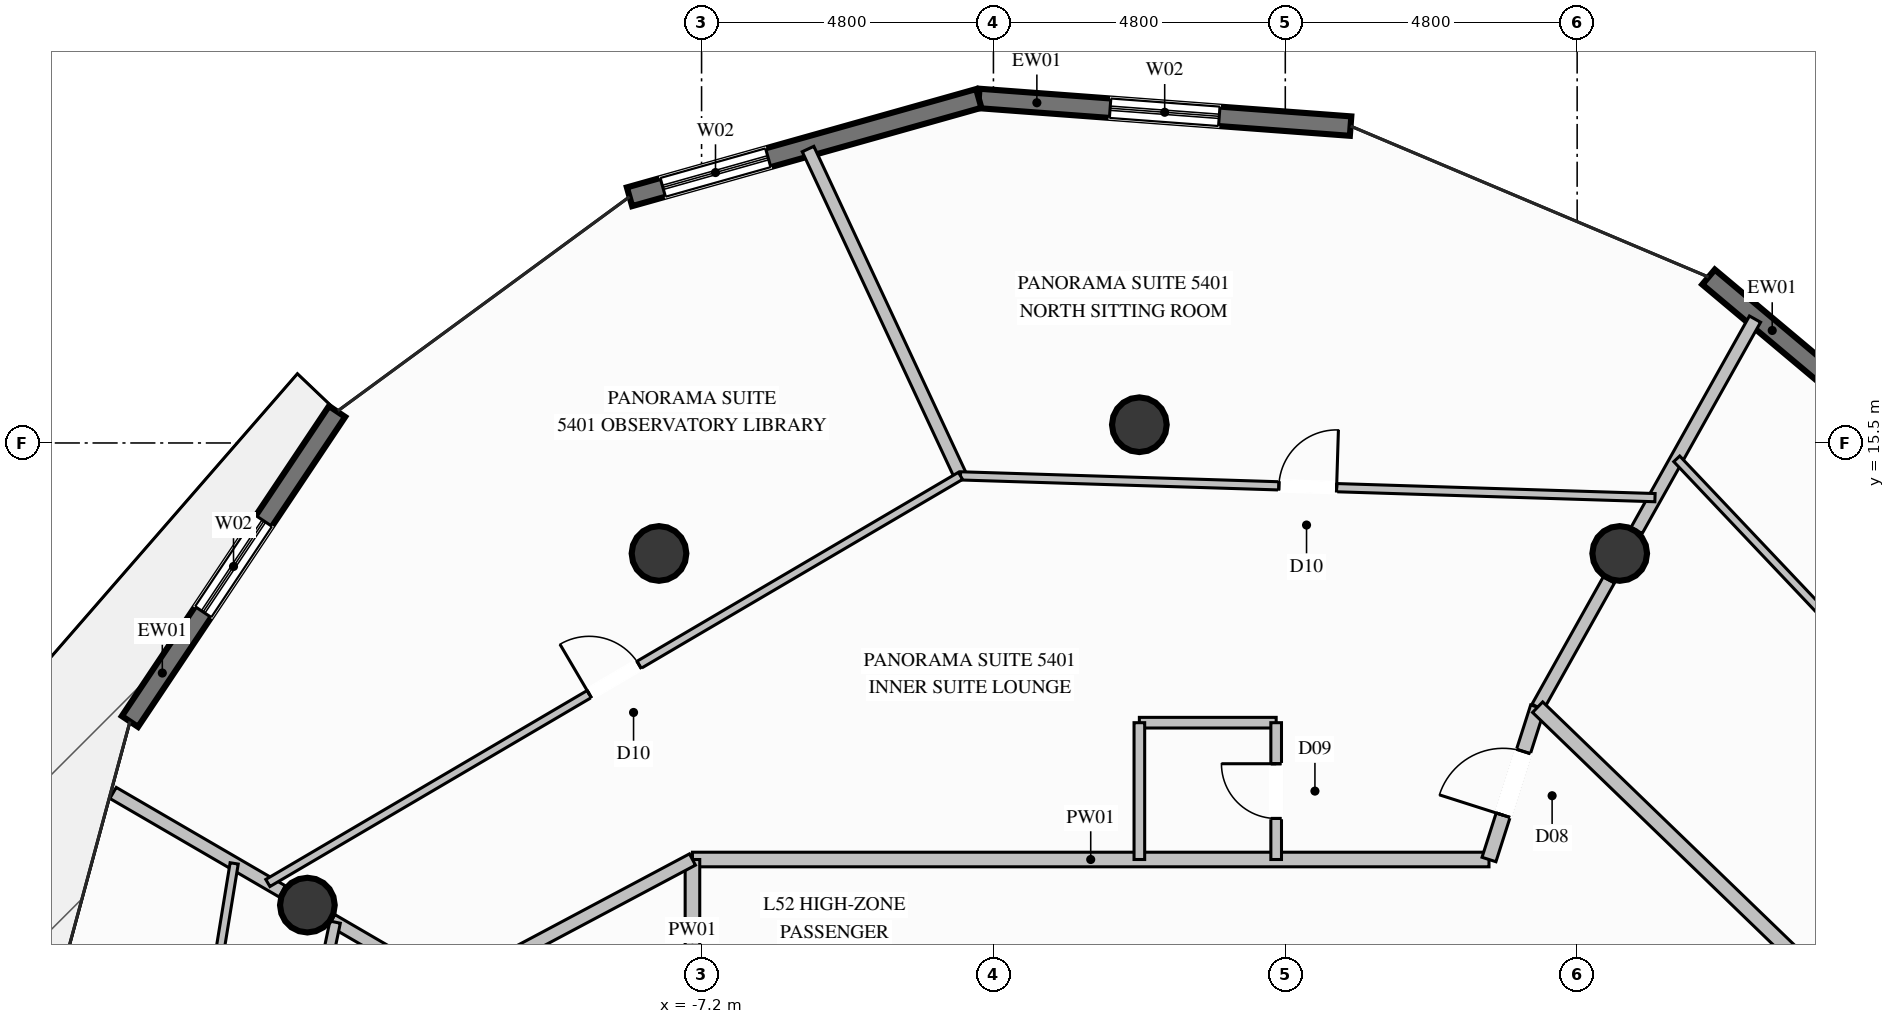
"""IFC4 building model, lengths in metres.
Left out: names, types, materials, properties, quantities, classifications, styles, units other than length and angle.
Written with IfcOpenShell. Run it as: python <this file> out.ifc"""

import sys

from ifc_helpers import new_model, si_unit, direction, frame, frame_2d, origin, origin_2d, place, context, subcontext, project, spatial, rectangle, circle, extrude, element, fill, save


model = new_model("IFC4")
c1 = context("Model", 3, precision=1e-05, world=origin(), true_north=direction((0.0, 1.0)))
c2 = subcontext(c1, "Body", "Model", "MODEL_VIEW")
j1 = project(units=[si_unit("LENGTHUNIT", "METRE"), si_unit("PLANEANGLEUNIT", "RADIAN")], contexts=[c1])
p1 = place(None, origin())
s1 = spatial("IfcSite", under=j1, at=p1, CompositionType="ELEMENT")
p2 = place(p1, origin())
s2 = spatial("IfcBuilding", under=s1, at=p2, CompositionType="ELEMENT")
p3 = place(p2, frame((0.0, 0.0, 202.0)))
s3 = spatial("IfcBuildingStorey", under=s2, at=p3, CompositionType="ELEMENT", Elevation=202.0)
for number, where, z_axis, x_axis in (
    (1, (7.9, 13.683, 0.0), (0.0, 0.0, 1.0), (1.0, 0.0, 0.0)),
    (2, (0.0, 15.8, 0.0), (0.0, 0.0, 1.0), (1.0, 0.0, 0.0)),
    (3, (-7.9, 13.683, 0.0), (0.0, 0.0, 1.0), (1.0, 0.0, 0.0)),
    (4, (-13.683, 7.9, 0.0), (0.0, 0.0, 1.0), (1.0, 0.0, 0.0)),
):
    element("IfcColumn", number, at=place(p3, frame(where, z_axis=z_axis, x_axis=x_axis)), inside=s3, PredefinedType="COLUMN", context=c2, shape_type="SweptSolid", body=[
        extrude(circle(Radius=0.45, at=origin_2d()), origin(), (0.0, 0.0, 1.0), 3.6),
    ])
p4 = place(p3, frame((9.361, 18.229, 0.0), z_axis=(0.0, 0.0, 1.0), x_axis=(0.765961316102, -0.642886663601, 0.0)))
e5 = element("IfcWall", 5, at=p4, inside=s3, PredefinedType="SOLIDWALL", context=c2, shape_type="SweptSolid", body=[
    extrude(rectangle(XDim=6.637, YDim=0.32, at=frame_2d((3.319, 0.0))), origin(), (0.0, 0.0, 1.0), 3.36),
])
p5 = place(p4, frame((2.984, 0.0, 0.35)))
e6 = element("IfcOpeningElement", 6, at=p5, cuts=e5, PredefinedType="OPENING", context=c2, shape_type="SweptSolid", body=[
    extrude(rectangle(XDim=1.8, YDim=2.6, at=frame_2d((0.9, 1.3))), frame((0.0, 0.17, 0.0), z_axis=(0.0, -1.0, 0.0), x_axis=(1.0, 0.0, 0.0)), (0.0, 0.0, 1.0), 0.34),
])
p6 = place(p3, frame((-2.641, 21.166, 0.0), z_axis=(0.0, 0.0, 1.0), x_axis=(0.997242494029, -0.074211913481, 0.0)))
e7 = element("IfcWall", 7, at=p6, inside=s3, PredefinedType="SOLIDWALL", context=c2, shape_type="SweptSolid", body=[
    extrude(rectangle(XDim=6.132, YDim=0.32, at=frame_2d((3.066, 0.0))), origin(), (0.0, 0.0, 1.0), 3.36),
])
p7 = place(p6, frame((2.166, 0.0, 0.35)))
e8 = element("IfcOpeningElement", 8, at=p7, cuts=e7, PredefinedType="OPENING", context=c2, shape_type="SweptSolid", body=[
    extrude(rectangle(XDim=1.8, YDim=2.6, at=frame_2d((0.9, 1.3))), frame((0.0, 0.17, 0.0), z_axis=(0.0, -1.0, 0.0), x_axis=(1.0, 0.0, 0.0)), (0.0, 0.0, 1.0), 0.34),
])
p8 = place(p3, frame((-8.385, 19.549, 0.0), z_axis=(0.0, 0.0, 1.0), x_axis=(0.962586598212, 0.270974244058, 0.0)))
e9 = element("IfcWall", 9, at=p8, inside=s3, PredefinedType="SOLIDWALL", context=c2, shape_type="SweptSolid", body=[
    extrude(rectangle(XDim=5.967, YDim=0.32, at=frame_2d((2.983, 0.0))), origin(), (0.0, 0.0, 1.0), 3.36),
])
p9 = place(p8, frame((0.569, 0.0, 0.35)))
e10 = element("IfcOpeningElement", 10, at=p9, cuts=e9, PredefinedType="OPENING", context=c2, shape_type="SweptSolid", body=[
    extrude(rectangle(XDim=1.8, YDim=2.6, at=frame_2d((0.9, 1.3))), frame((0.0, 0.17, 0.0), z_axis=(0.0, -1.0, 0.0), x_axis=(1.0, 0.0, 0.0)), (0.0, 0.0, 1.0), 0.34),
])
p10 = place(p3, frame((-16.601, 10.92, 0.0), z_axis=(0.0, 0.0, 1.0), x_axis=(0.555517753524, 0.831504675585, 0.0)))
e11 = element("IfcWall", 11, at=p10, inside=s3, PredefinedType="SOLIDWALL", context=c2, shape_type="SweptSolid", body=[
    extrude(rectangle(XDim=6.131, YDim=0.32, at=frame_2d((3.066, 0.0))), origin(), (0.0, 0.0, 1.0), 3.36),
])
p11 = place(p10, frame((2.166, 0.0, 0.35)))
e12 = element("IfcOpeningElement", 12, at=p11, cuts=e11, PredefinedType="OPENING", context=c2, shape_type="SweptSolid", body=[
    extrude(rectangle(XDim=1.8, YDim=2.6, at=frame_2d((0.9, 1.3))), frame((0.0, 0.17, 0.0), z_axis=(0.0, -1.0, 0.0), x_axis=(1.0, 0.0, 0.0)), (0.0, 0.0, 1.0), 0.34),
])
p12 = place(p3, frame((-7.35, 8.65, 0.0), z_axis=(0.0, 0.0, 1.0), x_axis=(1.0, 0.0, 0.0)))
e13 = element("IfcWall", 13, at=p12, inside=s3, PredefinedType="PARTITIONING", context=c2, shape_type="SweptSolid", body=[
    extrude(rectangle(XDim=13.1, YDim=0.24, at=frame_2d((6.55, 0.0))), origin(), (0.0, 0.0, 1.0), 3.36),
])
p13 = place(p3, frame((-7.35, 4.95, 0.0), z_axis=(0.0, 0.0, 1.0), x_axis=(0.0, 1.0, 0.0)))
e14 = element("IfcWall", 14, at=p13, inside=s3, PredefinedType="PARTITIONING", context=c2, shape_type="SweptSolid", body=[
    extrude(rectangle(XDim=3.7, YDim=0.24, at=frame_2d((1.85, 0.0))), origin(), (0.0, 0.0, 1.0), 2.445),
])
p14 = place(p3, frame((6.55, 11.155, 0.0), z_axis=(0.0, 0.0, 1.0), x_axis=(0.488535184748, 0.872544195593, 0.0)))
e15 = element("IfcWall", 15, at=p14, inside=s3, PredefinedType="PARTITIONING", context=c2, shape_type="SweptSolid", body=[
    extrude(rectangle(XDim=2.399, YDim=0.21, at=frame_2d((1.199, 0.0))), origin(), (0.0, 0.0, 1.0), 2.801),
])
p15 = place(p3, frame((8.178, 14.062, 0.0), z_axis=(0.0, 0.0, 1.0), x_axis=(0.488788123952, 0.87240252744, 0.0)))
e16 = element("IfcWall", 16, at=p15, inside=s3, PredefinedType="PARTITIONING", context=c2, shape_type="SweptSolid", body=[
    extrude(rectangle(XDim=3.983, YDim=0.21, at=frame_2d((1.992, 0.0))), origin(), (0.0, 0.0, 1.0), 3.36),
])
p16 = place(p3, frame((-11.345, 6.525, 0.0), z_axis=(0.0, 0.0, 1.0), x_axis=(-0.864228712324, 0.5030991282, 0.0)))
e17 = element("IfcWall", 17, at=p16, inside=s3, PredefinedType="PARTITIONING", context=c2, shape_type="SweptSolid", body=[
    extrude(rectangle(XDim=2.242, YDim=0.21, at=frame_2d((1.121, 0.0))), origin(), (0.0, 0.0, 1.0), 2.801),
])
p17 = place(p3, frame((-14.095, 8.125, 0.0), z_axis=(0.0, 0.0, 1.0), x_axis=(-0.864298015092, 0.502980060348, 0.0)))
e18 = element("IfcWall", 18, at=p17, inside=s3, PredefinedType="PARTITIONING", context=c2, shape_type="SweptSolid", body=[
    extrude(rectangle(XDim=3.221, YDim=0.21, at=frame_2d((1.61, 0.0))), origin(), (0.0, 0.0, 1.0), 3.36),
])
for number, where, z_axis, x_axis in (
    (19, (0.0, 10.9, 0.0), (0.0, 0.0, 1.0), (1.0, 0.0, 0.0)),
    (20, (0.0, 10.9, 0.0), (0.0, 0.0, 1.0), (0.0, -1.0, 0.0)),
):
    element("IfcWall", number, at=place(p3, frame(where, z_axis=z_axis, x_axis=x_axis)), inside=s3, PredefinedType="PLUMBINGWALL", context=c2, shape_type="SweptSolid", body=[
        extrude(rectangle(XDim=2.25, YDim=0.175, at=frame_2d((1.125, 0.0))), origin(), (0.0, 0.0, 1.0), 3.36),
    ])
p18 = place(p3, frame((2.25, 8.65, 0.0), z_axis=(0.0, 0.0, 1.0), x_axis=(0.0, 1.0, 0.0)))
e21 = element("IfcWall", 21, at=p18, inside=s3, PredefinedType="PLUMBINGWALL", context=c2, shape_type="SweptSolid", body=[
    extrude(rectangle(XDim=2.25, YDim=0.175, at=frame_2d((1.125, 0.0))), origin(), (0.0, 0.0, 1.0), 3.36),
])
p19 = place(p18, frame((0.675, 0.0, 0.0)))
e22 = element("IfcOpeningElement", 22, at=p19, cuts=e21, PredefinedType="OPENING", context=c2, shape_type="SweptSolid", body=[
    extrude(rectangle(XDim=0.9, YDim=2.1, at=frame_2d((0.45, 1.05))), frame((0.0, 0.098, 0.0), z_axis=(0.0, -1.0, 0.0), x_axis=(1.0, 0.0, 0.0)), (0.0, 0.0, 1.0), 0.195),
])
p20 = place(p3, frame((-11.345, 6.525, 0.0), z_axis=(0.0, 0.0, 1.0), x_axis=(0.882866201619, 0.469624605445, 0.0)))
e23 = element("IfcWall", 23, at=p20, inside=s3, PredefinedType="PARTITIONING", context=c2, shape_type="SweptSolid", body=[
    extrude(rectangle(XDim=4.525, YDim=0.21, at=frame_2d((2.262, 0.0))), origin(), (0.0, 0.0, 1.0), 3.36),
])
p21 = place(p3, frame((5.75, 8.65, 0.0), z_axis=(0.0, 0.0, 1.0), x_axis=(0.304226604656, 0.952599691906, 0.0)))
e24 = element("IfcWall", 24, at=p21, inside=s3, PredefinedType="PARTITIONING", context=c2, shape_type="SweptSolid", body=[
    extrude(rectangle(XDim=2.63, YDim=0.24, at=frame_2d((1.315, 0.0))), origin(), (0.0, 0.0, 1.0), 3.36),
])
p22 = place(p21, frame((0.765, 0.0, 0.0)))
e25 = element("IfcOpeningElement", 25, at=p22, cuts=e24, PredefinedType="OPENING", context=c2, shape_type="SweptSolid", body=[
    extrude(rectangle(XDim=1.1, YDim=2.3, at=frame_2d((0.55, 1.15))), frame((0.0, 0.13, 0.0), z_axis=(0.0, -1.0, 0.0), x_axis=(1.0, 0.0, 0.0)), (0.0, 0.0, 1.0), 0.26),
])
p23 = place(p3, frame((-2.942, 14.959, 0.0), z_axis=(0.0, 0.0, 1.0), x_axis=(-0.422711938281, 0.906264099054, 0.0)))
e26 = element("IfcWall", 26, at=p23, inside=s3, PredefinedType="PARTITIONING", context=c2, shape_type="SweptSolid", body=[
    extrude(rectangle(XDim=5.931, YDim=0.21, at=frame_2d((2.965, 0.0))), origin(), (0.0, 0.0, 1.0), 3.36),
])
p24 = place(p3, frame((-2.942, 14.959, 0.0), z_axis=(0.0, 0.0, 1.0), x_axis=(0.999509404504, -0.031320126261, 0.0)))
e27 = element("IfcWall", 27, at=p24, inside=s3, PredefinedType="PARTITIONING", context=c2, shape_type="SweptSolid", body=[
    extrude(rectangle(XDim=11.427, YDim=0.135, at=frame_2d((5.714, 0.0))), origin(), (0.0, 0.0, 1.0), 2.929),
])
p25 = place(p24, frame((5.239, 0.0, 0.0)))
e28 = element("IfcOpeningElement", 28, at=p25, cuts=e27, PredefinedType="OPENING", context=c2, shape_type="SweptSolid", body=[
    extrude(rectangle(XDim=0.95, YDim=2.1, at=frame_2d((0.475, 1.05))), frame((0.0, 0.078, 0.0), z_axis=(0.0, -1.0, 0.0), x_axis=(1.0, 0.0, 0.0)), (0.0, 0.0, 1.0), 0.155),
])
p26 = place(p3, frame((-14.333, 8.264, 0.0), z_axis=(0.0, 0.0, 1.0), x_axis=(0.862118932007, 0.506705976948, 0.0)))
e29 = element("IfcWall", 29, at=p26, inside=s3, PredefinedType="PARTITIONING", context=c2, shape_type="SweptSolid", body=[
    extrude(rectangle(XDim=13.213, YDim=0.135, at=frame_2d((6.606, 0.0))), origin(), (0.0, 0.0, 1.0), 2.929),
])
p27 = place(p26, frame((6.131, 0.0, 0.0)))
e30 = element("IfcOpeningElement", 30, at=p27, cuts=e29, PredefinedType="OPENING", context=c2, shape_type="SweptSolid", body=[
    extrude(rectangle(XDim=0.95, YDim=2.1, at=frame_2d((0.475, 1.05))), frame((0.0, 0.078, 0.0), z_axis=(0.0, -1.0, 0.0), x_axis=(1.0, 0.0, 0.0)), (0.0, 0.0, 1.0), 0.155),
])
p28 = place(p3, frame((-13.227, 7.62, 0.0), z_axis=(0.0, 0.0, 1.0), x_axis=(-0.203899627086, -0.978991798778, 0.0)))
e31 = element("IfcWall", 31, at=p28, inside=s3, PredefinedType="PLUMBINGWALL", context=c2, shape_type="SweptSolid", body=[
    extrude(rectangle(XDim=3.212, YDim=0.175, at=frame_2d((1.606, 0.0))), origin(), (0.0, 0.0, 1.0), 2.929),
])
p29 = place(p3, frame((-14.887, 8.586, 0.0), z_axis=(0.0, 0.0, 1.0), x_axis=(-0.16114427543, -0.986930860038, 0.0)))
e32 = element("IfcWall", 32, at=p29, inside=s3, PredefinedType="PARTITIONING", context=c2, shape_type="SweptSolid", body=[
    extrude(rectangle(XDim=8.627, YDim=0.135, at=frame_2d((4.313, 0.0))), origin(), (0.0, 0.0, 1.0), 2.929),
])
p30 = place(p29, frame((3.838, 0.0, 0.0)))
e33 = element("IfcOpeningElement", 33, at=p30, cuts=e32, PredefinedType="OPENING", context=c2, shape_type="SweptSolid", body=[
    extrude(rectangle(XDim=0.95, YDim=2.1, at=frame_2d((0.475, 1.05))), frame((0.0, 0.078, 0.0), z_axis=(0.0, -1.0, 0.0), x_axis=(1.0, 0.0, 0.0)), (0.0, 0.0, 1.0), 0.155),
])
p31 = place(p3, frame((11.345, 6.525, 0.0), z_axis=(0.0, 0.0, 1.0), x_axis=(-0.719360436772, 0.694637000172, 0.0)))
e34 = element("IfcWall", 34, at=p31, inside=s3, PredefinedType="PARTITIONING", context=c2, shape_type="SweptSolid", body=[
    extrude(rectangle(XDim=6.666, YDim=0.24, at=frame_2d((3.333, 0.0))), origin(), (0.0, 0.0, 1.0), 3.36),
])
p32 = place(p3, frame((15.048, 8.679, 0.0), z_axis=(0.0, 0.0, 1.0), x_axis=(-0.687476978128, 0.726206172202, 0.0)))
e35 = element("IfcWall", 35, at=p32, inside=s3, PredefinedType="PARTITIONING", context=c2, shape_type="SweptSolid", body=[
    extrude(rectangle(XDim=9.033, YDim=0.135, at=frame_2d((4.517, 0.0))), origin(), (0.0, 0.0, 1.0), 3.36),
])
p33 = place(p32, frame((4.042, 0.0, 0.0)))
e36 = element("IfcOpeningElement", 36, at=p33, cuts=e35, PredefinedType="OPENING", context=c2, shape_type="SweptSolid", body=[
    extrude(rectangle(XDim=0.95, YDim=2.1, at=frame_2d((0.475, 1.05))), frame((0.0, 0.078, 0.0), z_axis=(0.0, -1.0, 0.0), x_axis=(1.0, 0.0, 0.0)), (0.0, 0.0, 1.0), 0.155),
])
p34 = place(p7, origin())
e37 = element("IfcWindow", 37, at=p34, inside=s3, PartitioningType="SINGLE_PANEL", PredefinedType="WINDOW", context=c2, shape_type="SweptSolid", body=[
    extrude(rectangle(XDim=1.8, YDim=2.6, at=frame_2d((0.9, 1.3))), frame((0.0, 0.03, 0.0), z_axis=(0.0, -1.0, 0.0), x_axis=(1.0, 0.0, 0.0)), (0.0, 0.0, 1.0), 0.06),
])
fill(e8, e37)
p35 = place(p9, origin())
e38 = element("IfcWindow", 38, at=p35, inside=s3, PartitioningType="SINGLE_PANEL", PredefinedType="WINDOW", context=c2, shape_type="SweptSolid", body=[
    extrude(rectangle(XDim=1.8, YDim=2.6, at=frame_2d((0.9, 1.3))), frame((0.0, 0.03, 0.0), z_axis=(0.0, -1.0, 0.0), x_axis=(1.0, 0.0, 0.0)), (0.0, 0.0, 1.0), 0.06),
])
fill(e10, e38)
p36 = place(p11, origin())
e39 = element("IfcWindow", 39, at=p36, inside=s3, PartitioningType="SINGLE_PANEL", PredefinedType="WINDOW", context=c2, shape_type="SweptSolid", body=[
    extrude(rectangle(XDim=1.8, YDim=2.6, at=frame_2d((0.9, 1.3))), frame((0.0, 0.03, 0.0), z_axis=(0.0, -1.0, 0.0), x_axis=(1.0, 0.0, 0.0)), (0.0, 0.0, 1.0), 0.06),
])
fill(e12, e39)
p37 = place(p19, origin())
e40 = element("IfcDoor", 40, at=p37, inside=s3, OperationType="SINGLE_SWING_RIGHT", PredefinedType="DOOR", context=c2, shape_type="SweptSolid", body=[
    extrude(rectangle(XDim=0.9, YDim=2.1, at=frame_2d((0.45, 1.05))), frame((0.0, 0.025, 0.0), z_axis=(0.0, -1.0, 0.0), x_axis=(1.0, 0.0, 0.0)), (0.0, 0.0, 1.0), 0.05),
])
fill(e22, e40)
p38 = place(p22, origin())
e41 = element("IfcDoor", 41, at=p38, inside=s3, OperationType="SINGLE_SWING_LEFT", PredefinedType="DOOR", context=c2, shape_type="SweptSolid", body=[
    extrude(rectangle(XDim=1.1, YDim=2.3, at=frame_2d((0.55, 1.15))), frame((0.0, 0.025, 0.0), z_axis=(0.0, -1.0, 0.0), x_axis=(1.0, 0.0, 0.0)), (0.0, 0.0, 1.0), 0.05),
])
fill(e25, e41)
p39 = place(p25, origin())
e42 = element("IfcDoor", 42, at=p39, inside=s3, OperationType="SINGLE_SWING_RIGHT", PredefinedType="DOOR", context=c2, shape_type="SweptSolid", body=[
    extrude(rectangle(XDim=0.95, YDim=2.1, at=frame_2d((0.475, 1.05))), frame((0.0, 0.025, 0.0), z_axis=(0.0, -1.0, 0.0), x_axis=(1.0, 0.0, 0.0)), (0.0, 0.0, 1.0), 0.05),
])
fill(e28, e42)
p40 = place(p27, origin())
e43 = element("IfcDoor", 43, at=p40, inside=s3, OperationType="SINGLE_SWING_LEFT", PredefinedType="DOOR", context=c2, shape_type="SweptSolid", body=[
    extrude(rectangle(XDim=0.95, YDim=2.1, at=frame_2d((0.475, 1.05))), frame((0.0, 0.025, 0.0), z_axis=(0.0, -1.0, 0.0), x_axis=(1.0, 0.0, 0.0)), (0.0, 0.0, 1.0), 0.05),
])
fill(e30, e43)
save(model, sys.argv[1])
